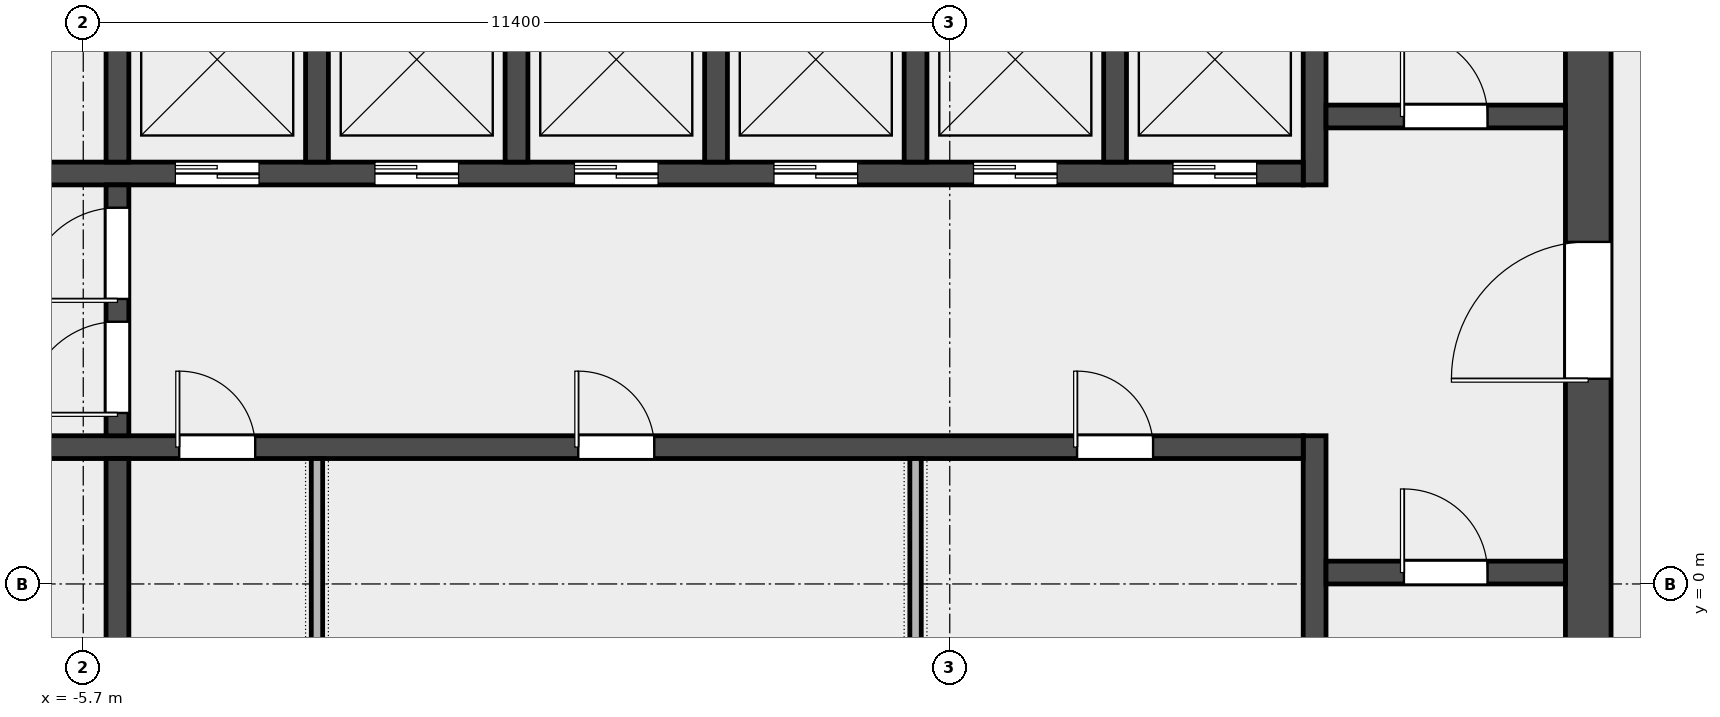
"""IFC4 building model, lengths in metres.
Left out: names, types, materials, properties, quantities, classifications, styles, units other than length and angle.
Written with IfcOpenShell. Run it as: python <this file> out.ifc"""

import sys

from ifc_helpers import new_model, si_unit, direction, frame, frame_2d, origin, place, context, subcontext, project, spatial, rectangle, extrude, element, fill, save


model = new_model("IFC4")
c1 = context("Model", 3, precision=1e-05, world=origin(), true_north=direction((0.0, 1.0)))
c2 = subcontext(c1, "Body", "Model", "MODEL_VIEW")
j1 = project(units=[si_unit("LENGTHUNIT", "METRE"), si_unit("PLANEANGLEUNIT", "RADIAN")], contexts=[c1])
p1 = place(None, origin())
s1 = spatial("IfcSite", under=j1, at=p1, CompositionType="ELEMENT")
p2 = place(p1, origin())
s2 = spatial("IfcBuilding", under=s1, at=p2, CompositionType="ELEMENT")
p3 = place(p2, frame((0.0, 0.0, 349.4)))
s3 = spatial("IfcBuildingStorey", under=s2, at=p3, CompositionType="ELEMENT", Elevation=349.4)
p4 = place(p3, frame((14.1, -6.6, 0.0), z_axis=(0.0, 0.0, 1.0), x_axis=(0.0, 1.0, 0.0)))
e1 = element("IfcWall", 1, at=p4, inside=s3, PredefinedType="SHEAR", context=c2, shape_type="SweptSolid", body=[
    extrude(rectangle(XDim=19.5, YDim=0.6, at=frame_2d((9.75, 0.0))), origin(), (0.0, 0.0, 1.0), 3.7),
])
p5 = place(p4, frame((9.3, 0.0, 0.0)))
e2 = element("IfcOpeningElement", 2, at=p5, cuts=e1, PredefinedType="OPENING", context=c2, shape_type="SweptSolid", body=[
    extrude(rectangle(XDim=1.8, YDim=2.1, at=frame_2d((0.9, 1.05))), frame((0.0, 0.312, 0.0), z_axis=(0.0, -1.0, 0.0), x_axis=(1.0, 0.0, 0.0)), (0.0, 0.0, 1.0), 0.624),
])
p6 = place(p3, frame((10.5, -6.6, 0.0), z_axis=(0.0, 0.0, 1.0), x_axis=(0.0, 1.0, 0.0)))
e3 = element("IfcWall", 3, at=p6, inside=s3, PredefinedType="SHEAR", context=c2, shape_type="SweptSolid", body=[
    extrude(rectangle(XDim=8.55, YDim=0.3, at=frame_2d((4.275, 0.0))), origin(), (0.0, 0.0, 1.0), 3.7),
])
p7 = place(p3, frame((10.5, 5.25, 0.0), z_axis=(0.0, 0.0, 1.0), x_axis=(0.0, 1.0, 0.0)))
e4 = element("IfcWall", 4, at=p7, inside=s3, PredefinedType="SHEAR", context=c2, shape_type="SweptSolid", body=[
    extrude(rectangle(XDim=7.65, YDim=0.3, at=frame_2d((3.825, 0.0))), origin(), (0.0, 0.0, 1.0), 3.7),
])
p8 = place(p3, frame((10.65, 0.15, 0.0), z_axis=(0.0, 0.0, 1.0), x_axis=(1.0, 0.0, 0.0)))
e5 = element("IfcWall", 5, at=p8, inside=s3, PredefinedType="SOLIDWALL", context=c2, shape_type="SweptSolid", body=[
    extrude(rectangle(XDim=3.15, YDim=0.3, at=frame_2d((1.575, 0.0))), origin(), (0.0, 0.0, 1.0), 3.7),
])
p9 = place(p8, frame((1.025, 0.0, 0.0)))
e6 = element("IfcOpeningElement", 6, at=p9, cuts=e5, PredefinedType="OPENING", context=c2, shape_type="SweptSolid", body=[
    extrude(rectangle(XDim=1.1, YDim=2.1, at=frame_2d((0.55, 1.05))), frame((0.0, 0.162, 0.0), z_axis=(0.0, -1.0, 0.0), x_axis=(1.0, 0.0, 0.0)), (0.0, 0.0, 1.0), 0.324),
])
p10 = place(p3, frame((10.65, 6.15, 0.0), z_axis=(0.0, 0.0, 1.0), x_axis=(1.0, 0.0, 0.0)))
e7 = element("IfcWall", 7, at=p10, inside=s3, PredefinedType="SOLIDWALL", context=c2, shape_type="SweptSolid", body=[
    extrude(rectangle(XDim=3.15, YDim=0.3, at=frame_2d((1.575, 0.0))), origin(), (0.0, 0.0, 1.0), 3.7),
])
p11 = place(p10, frame((1.025, 0.0, 0.0)))
e8 = element("IfcOpeningElement", 8, at=p11, cuts=e7, PredefinedType="OPENING", context=c2, shape_type="SweptSolid", body=[
    extrude(rectangle(XDim=1.1, YDim=2.1, at=frame_2d((0.55, 1.05))), frame((0.0, 0.162, 0.0), z_axis=(0.0, -1.0, 0.0), x_axis=(1.0, 0.0, 0.0)), (0.0, 0.0, 1.0), 0.324),
])
p12 = place(p3, frame((-10.35, 1.8, 0.0), z_axis=(0.0, 0.0, 1.0), x_axis=(1.0, 0.0, 0.0)))
e9 = element("IfcWall", 9, at=p12, inside=s3, PredefinedType="SOLIDWALL", context=c2, shape_type="SweptSolid", body=[
    extrude(rectangle(XDim=20.7, YDim=0.3, at=frame_2d((10.35, 0.0))), origin(), (0.0, 0.0, 1.0), 3.7),
])
p13 = place(p12, frame((0.512, 0.0, 0.0)))
e10 = element("IfcOpeningElement", 10, at=p13, cuts=e9, PredefinedType="OPENING", context=c2, shape_type="SweptSolid", body=[
    extrude(rectangle(XDim=1.3, YDim=2.1, at=frame_2d((0.65, 1.05))), frame((0.0, 0.162, 0.0), z_axis=(0.0, -1.0, 0.0), x_axis=(1.0, 0.0, 0.0)), (0.0, 0.0, 1.0), 0.324),
])
p14 = place(p12, frame((5.913, 0.0, 0.0)))
e11 = element("IfcOpeningElement", 11, at=p14, cuts=e9, PredefinedType="OPENING", context=c2, shape_type="SweptSolid", body=[
    extrude(rectangle(XDim=1.0, YDim=2.1, at=frame_2d((0.5, 1.05))), frame((0.0, 0.162, 0.0), z_axis=(0.0, -1.0, 0.0), x_axis=(1.0, 0.0, 0.0)), (0.0, 0.0, 1.0), 0.324),
])
p15 = place(p12, frame((11.163, 0.0, 0.0)))
e12 = element("IfcOpeningElement", 12, at=p15, cuts=e9, PredefinedType="OPENING", context=c2, shape_type="SweptSolid", body=[
    extrude(rectangle(XDim=1.0, YDim=2.1, at=frame_2d((0.5, 1.05))), frame((0.0, 0.162, 0.0), z_axis=(0.0, -1.0, 0.0), x_axis=(1.0, 0.0, 0.0)), (0.0, 0.0, 1.0), 0.324),
])
p16 = place(p12, frame((17.725, 0.0, 0.0)))
e13 = element("IfcOpeningElement", 13, at=p16, cuts=e9, PredefinedType="OPENING", context=c2, shape_type="SweptSolid", body=[
    extrude(rectangle(XDim=1.0, YDim=2.1, at=frame_2d((0.5, 1.05))), frame((0.0, 0.162, 0.0), z_axis=(0.0, -1.0, 0.0), x_axis=(1.0, 0.0, 0.0)), (0.0, 0.0, 1.0), 0.324),
])
p17 = place(p3, frame((-10.35, 5.4, 0.0), z_axis=(0.0, 0.0, 1.0), x_axis=(1.0, 0.0, 0.0)))
e14 = element("IfcWall", 14, at=p17, inside=s3, PredefinedType="SOLIDWALL", context=c2, shape_type="SweptSolid", body=[
    extrude(rectangle(XDim=20.7, YDim=0.3, at=frame_2d((10.35, 0.0))), origin(), (0.0, 0.0, 1.0), 3.7),
])
p18 = place(p17, frame((0.512, 0.0, 0.0)))
e15 = element("IfcOpeningElement", 15, at=p18, cuts=e14, PredefinedType="OPENING", context=c2, shape_type="SweptSolid", body=[
    extrude(rectangle(XDim=1.3, YDim=2.1, at=frame_2d((0.65, 1.05))), frame((0.0, 0.162, 0.0), z_axis=(0.0, -1.0, 0.0), x_axis=(1.0, 0.0, 0.0)), (0.0, 0.0, 1.0), 0.324),
])
p19 = place(p17, frame((5.863, 0.0, 0.0)))
e16 = element("IfcOpeningElement", 16, at=p19, cuts=e14, PredefinedType="OPENING", context=c2, shape_type="SweptSolid", body=[
    extrude(rectangle(XDim=1.1, YDim=2.1, at=frame_2d((0.55, 1.05))), frame((0.0, 0.162, 0.0), z_axis=(0.0, -1.0, 0.0), x_axis=(1.0, 0.0, 0.0)), (0.0, 0.0, 1.0), 0.324),
])
p20 = place(p17, frame((8.488, 0.0, 0.0)))
e17 = element("IfcOpeningElement", 17, at=p20, cuts=e14, PredefinedType="OPENING", context=c2, shape_type="SweptSolid", body=[
    extrude(rectangle(XDim=1.1, YDim=2.1, at=frame_2d((0.55, 1.05))), frame((0.0, 0.162, 0.0), z_axis=(0.0, -1.0, 0.0), x_axis=(1.0, 0.0, 0.0)), (0.0, 0.0, 1.0), 0.324),
])
p21 = place(p17, frame((11.113, 0.0, 0.0)))
e18 = element("IfcOpeningElement", 18, at=p21, cuts=e14, PredefinedType="OPENING", context=c2, shape_type="SweptSolid", body=[
    extrude(rectangle(XDim=1.1, YDim=2.1, at=frame_2d((0.55, 1.05))), frame((0.0, 0.162, 0.0), z_axis=(0.0, -1.0, 0.0), x_axis=(1.0, 0.0, 0.0)), (0.0, 0.0, 1.0), 0.324),
])
p22 = place(p17, frame((13.738, 0.0, 0.0)))
e19 = element("IfcOpeningElement", 19, at=p22, cuts=e14, PredefinedType="OPENING", context=c2, shape_type="SweptSolid", body=[
    extrude(rectangle(XDim=1.1, YDim=2.1, at=frame_2d((0.55, 1.05))), frame((0.0, 0.162, 0.0), z_axis=(0.0, -1.0, 0.0), x_axis=(1.0, 0.0, 0.0)), (0.0, 0.0, 1.0), 0.324),
])
p23 = place(p17, frame((16.363, 0.0, 0.0)))
e20 = element("IfcOpeningElement", 20, at=p23, cuts=e14, PredefinedType="OPENING", context=c2, shape_type="SweptSolid", body=[
    extrude(rectangle(XDim=1.1, YDim=2.1, at=frame_2d((0.55, 1.05))), frame((0.0, 0.162, 0.0), z_axis=(0.0, -1.0, 0.0), x_axis=(1.0, 0.0, 0.0)), (0.0, 0.0, 1.0), 0.324),
])
p24 = place(p17, frame((18.988, 0.0, 0.0)))
e21 = element("IfcOpeningElement", 21, at=p24, cuts=e14, PredefinedType="OPENING", context=c2, shape_type="SweptSolid", body=[
    extrude(rectangle(XDim=1.1, YDim=2.1, at=frame_2d((0.55, 1.05))), frame((0.0, 0.162, 0.0), z_axis=(0.0, -1.0, 0.0), x_axis=(1.0, 0.0, 0.0)), (0.0, 0.0, 1.0), 0.324),
])
for number, where, z_axis, x_axis in (
    (22, (-5.25, -1.05, 0.0), (0.0, 0.0, 1.0), (0.0, 1.0, 0.0)),
    (23, (-5.25, 5.55, 0.0), (0.0, 0.0, 1.0), (0.0, 1.0, 0.0)),
    (24, (-2.625, 5.55, 0.0), (0.0, 0.0, 1.0), (0.0, 1.0, 0.0)),
    (25, (0.0, 5.55, 0.0), (0.0, 0.0, 1.0), (0.0, 1.0, 0.0)),
    (26, (2.625, 5.55, 0.0), (0.0, 0.0, 1.0), (0.0, 1.0, 0.0)),
    (27, (5.25, 5.55, 0.0), (0.0, 0.0, 1.0), (0.0, 1.0, 0.0)),
    (28, (7.875, 5.55, 0.0), (0.0, 0.0, 1.0), (0.0, 1.0, 0.0)),
):
    element("IfcWall", number, at=place(p3, frame(where, z_axis=z_axis, x_axis=x_axis)), inside=s3, PredefinedType="SOLIDWALL", context=c2, shape_type="SweptSolid", body=[
        extrude(rectangle(XDim=2.7, YDim=0.3, at=frame_2d((1.35, 0.0))), origin(), (0.0, 0.0, 1.0), 3.7),
    ])
p25 = place(p3, frame((-5.25, 1.95, 0.0), z_axis=(0.0, 0.0, 1.0), x_axis=(0.0, 1.0, 0.0)))
e29 = element("IfcWall", 29, at=p25, inside=s3, PredefinedType="SOLIDWALL", context=c2, shape_type="SweptSolid", body=[
    extrude(rectangle(XDim=3.3, YDim=0.3, at=frame_2d((1.65, 0.0))), origin(), (0.0, 0.0, 1.0), 3.7),
])
p26 = place(p25, frame((0.3, 0.0, 0.0)))
e30 = element("IfcOpeningElement", 30, at=p26, cuts=e29, PredefinedType="OPENING", context=c2, shape_type="SweptSolid", body=[
    extrude(rectangle(XDim=1.2, YDim=2.1, at=frame_2d((0.6, 1.05))), frame((0.0, 0.162, 0.0), z_axis=(0.0, -1.0, 0.0), x_axis=(1.0, 0.0, 0.0)), (0.0, 0.0, 1.0), 0.324),
])
p27 = place(p25, frame((1.8, 0.0, 0.0)))
e31 = element("IfcOpeningElement", 31, at=p27, cuts=e29, PredefinedType="OPENING", context=c2, shape_type="SweptSolid", body=[
    extrude(rectangle(XDim=1.2, YDim=2.1, at=frame_2d((0.6, 1.05))), frame((0.0, 0.162, 0.0), z_axis=(0.0, -1.0, 0.0), x_axis=(1.0, 0.0, 0.0)), (0.0, 0.0, 1.0), 0.324),
])
for number, where, z_axis, x_axis in (
    (32, (-2.625, -1.05, 0.0), (0.0, 0.0, 1.0), (0.0, 1.0, 0.0)),
    (33, (5.25, -1.05, 0.0), (0.0, 0.0, 1.0), (0.0, 1.0, 0.0)),
):
    element("IfcWall", number, at=place(p3, frame(where, z_axis=z_axis, x_axis=x_axis)), inside=s3, PredefinedType="PARTITIONING", context=c2, shape_type="SweptSolid", body=[
        extrude(rectangle(XDim=2.7, YDim=0.15, at=frame_2d((1.35, 0.0))), origin(), (0.0, 0.0, 1.0), 3.7),
    ])
p28 = place(p9, origin())
e34 = element("IfcDoor", 34, at=p28, inside=s3, OperationType="SINGLE_SWING_RIGHT", PredefinedType="DOOR", context=c2, shape_type="SweptSolid", body=[
    extrude(rectangle(XDim=1.1, YDim=2.1, at=frame_2d((0.55, 1.05))), frame((0.0, 0.025, 0.0), z_axis=(0.0, -1.0, 0.0), x_axis=(1.0, 0.0, 0.0)), (0.0, 0.0, 1.0), 0.05),
])
fill(e6, e34)
p29 = place(p11, origin())
e35 = element("IfcDoor", 35, at=p29, inside=s3, OperationType="SINGLE_SWING_RIGHT", PredefinedType="DOOR", context=c2, shape_type="SweptSolid", body=[
    extrude(rectangle(XDim=1.1, YDim=2.1, at=frame_2d((0.55, 1.05))), frame((0.0, 0.025, 0.0), z_axis=(0.0, -1.0, 0.0), x_axis=(1.0, 0.0, 0.0)), (0.0, 0.0, 1.0), 0.05),
])
fill(e8, e35)
p30 = place(p5, origin())
e36 = element("IfcDoor", 36, at=p30, inside=s3, OperationType="DOUBLE_DOOR_SINGLE_SWING", PredefinedType="DOOR", context=c2, shape_type="SweptSolid", body=[
    extrude(rectangle(XDim=1.8, YDim=2.1, at=frame_2d((0.9, 1.05))), frame((0.0, 0.025, 0.0), z_axis=(0.0, -1.0, 0.0), x_axis=(1.0, 0.0, 0.0)), (0.0, 0.0, 1.0), 0.05),
])
fill(e2, e36)
p31 = place(p26, origin())
e37 = element("IfcDoor", 37, at=p31, inside=s3, OperationType="SINGLE_SWING_LEFT", PredefinedType="DOOR", context=c2, shape_type="SweptSolid", body=[
    extrude(rectangle(XDim=1.2, YDim=2.1, at=frame_2d((0.6, 1.05))), frame((0.0, 0.025, 0.0), z_axis=(0.0, -1.0, 0.0), x_axis=(1.0, 0.0, 0.0)), (0.0, 0.0, 1.0), 0.05),
])
fill(e30, e37)
p32 = place(p27, origin())
e38 = element("IfcDoor", 38, at=p32, inside=s3, OperationType="SINGLE_SWING_RIGHT", PredefinedType="DOOR", context=c2, shape_type="SweptSolid", body=[
    extrude(rectangle(XDim=1.2, YDim=2.1, at=frame_2d((0.6, 1.05))), frame((0.0, 0.025, 0.0), z_axis=(0.0, -1.0, 0.0), x_axis=(1.0, 0.0, 0.0)), (0.0, 0.0, 1.0), 0.05),
])
fill(e31, e38)
p33 = place(p19, origin())
e39 = element("IfcDoor", 39, at=p33, inside=s3, OperationType="DOUBLE_DOOR_SLIDING", PredefinedType="DOOR", context=c2, shape_type="SweptSolid", body=[
    extrude(rectangle(XDim=1.1, YDim=2.1, at=frame_2d((0.55, 1.05))), frame((0.0, 0.025, 0.0), z_axis=(0.0, -1.0, 0.0), x_axis=(1.0, 0.0, 0.0)), (0.0, 0.0, 1.0), 0.05),
])
fill(e16, e39)
p34 = place(p20, origin())
e40 = element("IfcDoor", 40, at=p34, inside=s3, OperationType="DOUBLE_DOOR_SLIDING", PredefinedType="DOOR", context=c2, shape_type="SweptSolid", body=[
    extrude(rectangle(XDim=1.1, YDim=2.1, at=frame_2d((0.55, 1.05))), frame((0.0, 0.025, 0.0), z_axis=(0.0, -1.0, 0.0), x_axis=(1.0, 0.0, 0.0)), (0.0, 0.0, 1.0), 0.05),
])
fill(e17, e40)
p35 = place(p21, origin())
e41 = element("IfcDoor", 41, at=p35, inside=s3, OperationType="DOUBLE_DOOR_SLIDING", PredefinedType="DOOR", context=c2, shape_type="SweptSolid", body=[
    extrude(rectangle(XDim=1.1, YDim=2.1, at=frame_2d((0.55, 1.05))), frame((0.0, 0.025, 0.0), z_axis=(0.0, -1.0, 0.0), x_axis=(1.0, 0.0, 0.0)), (0.0, 0.0, 1.0), 0.05),
])
fill(e18, e41)
p36 = place(p22, origin())
e42 = element("IfcDoor", 42, at=p36, inside=s3, OperationType="DOUBLE_DOOR_SLIDING", PredefinedType="DOOR", context=c2, shape_type="SweptSolid", body=[
    extrude(rectangle(XDim=1.1, YDim=2.1, at=frame_2d((0.55, 1.05))), frame((0.0, 0.025, 0.0), z_axis=(0.0, -1.0, 0.0), x_axis=(1.0, 0.0, 0.0)), (0.0, 0.0, 1.0), 0.05),
])
fill(e19, e42)
p37 = place(p23, origin())
e43 = element("IfcDoor", 43, at=p37, inside=s3, OperationType="DOUBLE_DOOR_SLIDING", PredefinedType="DOOR", context=c2, shape_type="SweptSolid", body=[
    extrude(rectangle(XDim=1.1, YDim=2.1, at=frame_2d((0.55, 1.05))), frame((0.0, 0.025, 0.0), z_axis=(0.0, -1.0, 0.0), x_axis=(1.0, 0.0, 0.0)), (0.0, 0.0, 1.0), 0.05),
])
fill(e20, e43)
p38 = place(p24, origin())
e44 = element("IfcDoor", 44, at=p38, inside=s3, OperationType="DOUBLE_DOOR_SLIDING", PredefinedType="DOOR", context=c2, shape_type="SweptSolid", body=[
    extrude(rectangle(XDim=1.1, YDim=2.1, at=frame_2d((0.55, 1.05))), frame((0.0, 0.025, 0.0), z_axis=(0.0, -1.0, 0.0), x_axis=(1.0, 0.0, 0.0)), (0.0, 0.0, 1.0), 0.05),
])
fill(e21, e44)
p39 = place(p14, origin())
e45 = element("IfcDoor", 45, at=p39, inside=s3, OperationType="SINGLE_SWING_LEFT", PredefinedType="DOOR", context=c2, shape_type="SweptSolid", body=[
    extrude(rectangle(XDim=1.0, YDim=2.1, at=frame_2d((0.5, 1.05))), frame((0.0, 0.025, 0.0), z_axis=(0.0, -1.0, 0.0), x_axis=(1.0, 0.0, 0.0)), (0.0, 0.0, 1.0), 0.05),
])
fill(e11, e45)
p40 = place(p15, origin())
e46 = element("IfcDoor", 46, at=p40, inside=s3, OperationType="SINGLE_SWING_LEFT", PredefinedType="DOOR", context=c2, shape_type="SweptSolid", body=[
    extrude(rectangle(XDim=1.0, YDim=2.1, at=frame_2d((0.5, 1.05))), frame((0.0, 0.025, 0.0), z_axis=(0.0, -1.0, 0.0), x_axis=(1.0, 0.0, 0.0)), (0.0, 0.0, 1.0), 0.05),
])
fill(e12, e46)
p41 = place(p16, origin())
e47 = element("IfcDoor", 47, at=p41, inside=s3, OperationType="SINGLE_SWING_LEFT", PredefinedType="DOOR", context=c2, shape_type="SweptSolid", body=[
    extrude(rectangle(XDim=1.0, YDim=2.1, at=frame_2d((0.5, 1.05))), frame((0.0, 0.025, 0.0), z_axis=(0.0, -1.0, 0.0), x_axis=(1.0, 0.0, 0.0)), (0.0, 0.0, 1.0), 0.05),
])
fill(e13, e47)
save(model, sys.argv[1])
